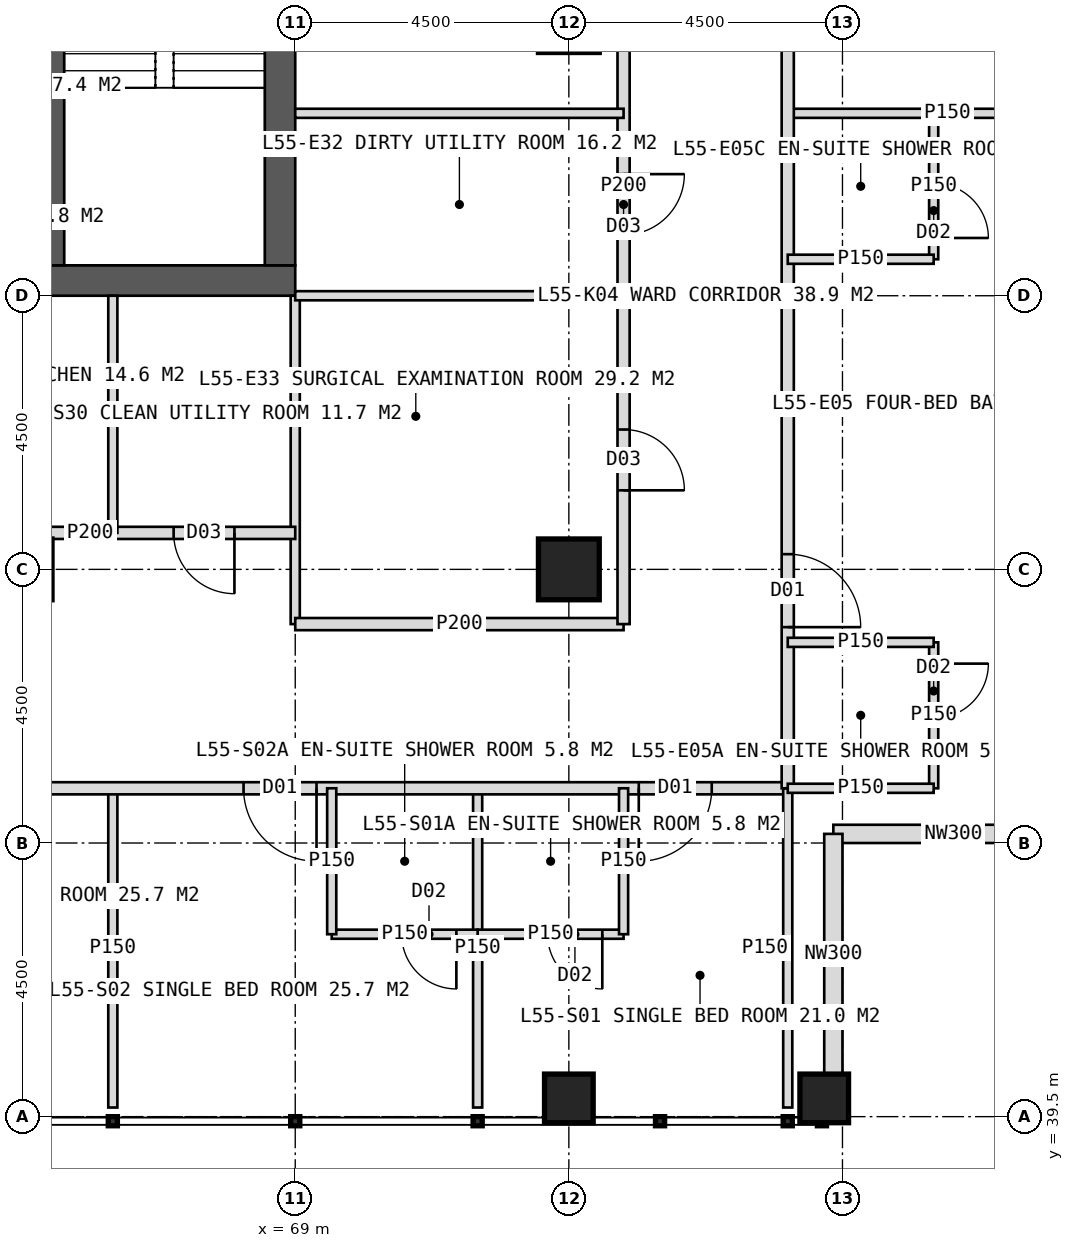
"""IFC4 building model, lengths in metres.
Left out: names, types, materials, properties, quantities, classifications, styles, units other than length and angle.
Written with IfcOpenShell. Run it as: python <this file> out.ifc"""

import sys

from ifc_helpers import new_model, si_unit, direction, frame, frame_2d, origin, origin_2d, place, context, subcontext, project, spatial, rectangle, hollow_rectangle, extrude, element, fill, save


model = new_model("IFC4")
c1 = context("Model", 3, precision=1e-05, world=origin(), true_north=direction((0.0, 1.0)))
c2 = subcontext(c1, "Body", "Model", "MODEL_VIEW")
j1 = project(units=[si_unit("LENGTHUNIT", "METRE"), si_unit("PLANEANGLEUNIT", "RADIAN")], contexts=[c1])
p1 = place(None, origin())
s1 = spatial("IfcSite", under=j1, at=p1, CompositionType="ELEMENT")
p2 = place(p1, origin())
s2 = spatial("IfcBuilding", under=s1, at=p2, CompositionType="ELEMENT")
p3 = place(p2, frame((0.0, 0.0, 229.0)))
s3 = spatial("IfcBuildingStorey", under=s2, at=p3, CompositionType="ELEMENT", Elevation=229.0)
p4 = place(p3, frame((51.0, 53.25, 0.0), z_axis=(0.0, 0.0, 1.0), x_axis=(1.0, 0.0, 0.0)))
e1 = element("IfcWall", 1, at=p4, inside=s3, PredefinedType="SHEAR", context=c2, shape_type="SweptSolid", body=[
    extrude(rectangle(XDim=18.0, YDim=0.5, at=frame_2d((9.0, 0.0))), origin(), (0.0, 0.0, 1.0), 4.0),
])
p5 = place(p4, frame((8.1, 0.0, 0.0)))
e2 = element("IfcOpeningElement", 2, at=p5, cuts=e1, PredefinedType="OPENING", context=c2, shape_type="SweptSolid", body=[
    extrude(rectangle(XDim=1.8, YDim=2.2, at=frame_2d((0.9, 1.1))), frame((0.0, 0.26, 0.0), z_axis=(0.0, -1.0, 0.0), x_axis=(1.0, 0.0, 0.0)), (0.0, 0.0, 1.0), 0.52),
])
p6 = place(p3, frame((68.75, 53.5, 0.0), z_axis=(0.0, 0.0, 1.0), x_axis=(0.0, 1.0, 0.0)))
e3 = element("IfcWall", 3, at=p6, inside=s3, PredefinedType="SHEAR", context=c2, shape_type="SweptSolid", body=[
    extrude(rectangle(XDim=17.0, YDim=0.5, at=frame_2d((8.5, 0.0))), origin(), (0.0, 0.0, 1.0), 4.0),
])
p7 = place(p6, frame((9.6, 0.0, 0.0)))
e4 = element("IfcOpeningElement", 4, at=p7, cuts=e3, PredefinedType="OPENING", context=c2, shape_type="SweptSolid", body=[
    extrude(rectangle(XDim=1.5, YDim=2.2, at=frame_2d((0.75, 1.1))), frame((0.0, 0.26, 0.0), z_axis=(0.0, -1.0, 0.0), x_axis=(1.0, 0.0, 0.0)), (0.0, 0.0, 1.0), 0.52),
])
p8 = place(p3, frame((65.05, 53.5, 0.0), z_axis=(0.0, 0.0, 1.0), x_axis=(0.0, 1.0, 0.0)))
e5 = element("IfcWall", 5, at=p8, inside=s3, PredefinedType="SHEAR", context=c2, shape_type="SweptSolid", body=[
    extrude(rectangle(XDim=17.0, YDim=0.3, at=frame_2d((8.5, 0.0))), origin(), (0.0, 0.0, 1.0), 4.0),
])
p9 = place(p3, frame((73.5, 48.5, 0.0), z_axis=(0.0, 0.0, 1.0), x_axis=(1.0, 0.0, 0.0)))
e6 = element("IfcColumn", 6, at=p9, inside=s3, PredefinedType="COLUMN", context=c2, shape_type="SweptSolid", body=[
    extrude(hollow_rectangle(XDim=1.0, YDim=1.0, WallThickness=0.1, at=origin_2d()), origin(), (0.0, 0.0, 1.0), 4.0),
])
for number, where, z_axis, x_axis in (
    (7, (73.5, 39.8, 0.0), (0.0, 0.0, 1.0), (1.0, 0.0, 0.0)),
    (8, (77.7, 39.8, 0.0), (0.0, 0.0, 1.0), (1.0, 0.0, 0.0)),
):
    element("IfcColumn", number, at=place(p3, frame(where, z_axis=z_axis, x_axis=x_axis)), inside=s3, PredefinedType="COLUMN", context=c2, shape_type="SweptSolid", body=[
        extrude(hollow_rectangle(XDim=0.8, YDim=0.8, WallThickness=0.08, at=origin_2d()), origin(), (0.0, 0.0, 1.0), 4.0),
    ])
for number, where, z_axis, x_axis in (
    (9, (81.8, 44.15, 0.0), (0.0, 0.0, 1.0), (-1.0, 0.0, 0.0)),
    (10, (77.85, 44.15, 0.0), (0.0, 0.0, 1.0), (0.0, -1.0, 0.0)),
):
    element("IfcWall", number, at=place(p3, frame(where, z_axis=z_axis, x_axis=x_axis)), inside=s3, PredefinedType="ELEMENTEDWALL", context=c2, shape_type="SweptSolid", body=[
        extrude(rectangle(XDim=3.95, YDim=0.3, at=frame_2d((1.975, 0.0))), origin(), (0.0, 0.0, 1.0), 2.85),
    ])
for number, where, z_axis, x_axis in (
    (11, (72.0, 44.9, 0.0), (0.0, 0.0, 1.0), (0.0, -1.0, 0.0)),
    (12, (66.0, 44.9, 0.0), (0.0, 0.0, 1.0), (0.0, -1.0, 0.0)),
):
    element("IfcWall", number, at=place(p3, frame(where, z_axis=z_axis, x_axis=x_axis)), inside=s3, PredefinedType="PARTITIONING", context=c2, shape_type="SweptSolid", body=[
        extrude(rectangle(XDim=5.25, YDim=0.15, at=frame_2d((2.625, 0.0))), origin(), (0.0, 0.0, 1.0), 3.75),
    ])
p10 = place(p3, frame((77.1, 44.9, 0.0), z_axis=(0.0, 0.0, 1.0), x_axis=(-1.0, 0.0, 0.0)))
e13 = element("IfcWall", 13, at=p10, inside=s3, PredefinedType="PARTITIONING", context=c2, shape_type="SweptSolid", body=[
    extrude(rectangle(XDim=34.2, YDim=0.2, at=frame_2d((17.1, 0.0))), origin(), (0.0, 0.0, 1.0), 3.75),
])
p11 = place(p10, frame((1.25, 0.0, 0.0)))
e14 = element("IfcOpeningElement", 14, at=p11, cuts=e13, PredefinedType="OPENING", context=c2, shape_type="SweptSolid", body=[
    extrude(rectangle(XDim=1.2, YDim=2.2, at=frame_2d((0.6, 1.1))), frame((0.0, 0.11, 0.0), z_axis=(0.0, -1.0, 0.0), x_axis=(1.0, 0.0, 0.0)), (0.0, 0.0, 1.0), 0.22),
])
p12 = place(p10, frame((7.75, 0.0, 0.0)))
e15 = element("IfcOpeningElement", 15, at=p12, cuts=e13, PredefinedType="OPENING", context=c2, shape_type="SweptSolid", body=[
    extrude(rectangle(XDim=1.2, YDim=2.2, at=frame_2d((0.6, 1.1))), frame((0.0, 0.11, 0.0), z_axis=(0.0, -1.0, 0.0), x_axis=(1.0, 0.0, 0.0)), (0.0, 0.0, 1.0), 0.22),
])
p13 = place(p10, frame((13.25, 0.0, 0.0)))
e16 = element("IfcOpeningElement", 16, at=p13, cuts=e13, PredefinedType="OPENING", context=c2, shape_type="SweptSolid", body=[
    extrude(rectangle(XDim=1.2, YDim=2.2, at=frame_2d((0.6, 1.1))), frame((0.0, 0.11, 0.0), z_axis=(0.0, -1.0, 0.0), x_axis=(1.0, 0.0, 0.0)), (0.0, 0.0, 1.0), 0.22),
])
p14 = place(p10, frame((19.75, 0.0, 0.0)))
e17 = element("IfcOpeningElement", 17, at=p14, cuts=e13, PredefinedType="OPENING", context=c2, shape_type="SweptSolid", body=[
    extrude(rectangle(XDim=1.2, YDim=2.2, at=frame_2d((0.6, 1.1))), frame((0.0, 0.11, 0.0), z_axis=(0.0, -1.0, 0.0), x_axis=(1.0, 0.0, 0.0)), (0.0, 0.0, 1.0), 0.22),
])
p15 = place(p10, frame((30.35, 0.0, 0.0)))
e18 = element("IfcOpeningElement", 18, at=p15, cuts=e13, PredefinedType="OPENING", context=c2, shape_type="SweptSolid", body=[
    extrude(rectangle(XDim=1.2, YDim=2.2, at=frame_2d((0.6, 1.1))), frame((0.0, 0.11, 0.0), z_axis=(0.0, -1.0, 0.0), x_axis=(1.0, 0.0, 0.0)), (0.0, 0.0, 1.0), 0.22),
])
p16 = place(p3, frame((77.1, 44.9, 0.0), z_axis=(0.0, 0.0, 1.0), x_axis=(0.0, -1.0, 0.0)))
e19 = element("IfcWall", 19, at=p16, inside=s3, PredefinedType="PARTITIONING", context=c2, shape_type="SweptSolid", body=[
    extrude(rectangle(XDim=5.25, YDim=0.15, at=frame_2d((2.625, 0.0))), origin(), (0.0, 0.0, 1.0), 3.75),
])
p17 = place(p3, frame((74.4, 42.5, 0.0), z_axis=(0.0, 0.0, 1.0), x_axis=(-1.0, 0.0, 0.0)))
e20 = element("IfcWall", 20, at=p17, inside=s3, PredefinedType="PARTITIONING", context=c2, shape_type="SweptSolid", body=[
    extrude(rectangle(XDim=2.4, YDim=0.15, at=frame_2d((1.2, 0.0))), origin(), (0.0, 0.0, 1.0), 3.75),
])
p18 = place(p17, frame((0.35, 0.0, 0.0)))
e21 = element("IfcOpeningElement", 21, at=p18, cuts=e20, PredefinedType="OPENING", context=c2, shape_type="SweptSolid", body=[
    extrude(rectangle(XDim=0.9, YDim=2.1, at=frame_2d((0.45, 1.05))), frame((0.0, 0.085, 0.0), z_axis=(0.0, -1.0, 0.0), x_axis=(1.0, 0.0, 0.0)), (0.0, 0.0, 1.0), 0.17),
])
p19 = place(p3, frame((74.4, 44.9, 0.0), z_axis=(0.0, 0.0, 1.0), x_axis=(0.0, -1.0, 0.0)))
e22 = element("IfcWall", 22, at=p19, inside=s3, PredefinedType="PARTITIONING", context=c2, shape_type="SweptSolid", body=[
    extrude(rectangle(XDim=2.4, YDim=0.15, at=frame_2d((1.2, 0.0))), origin(), (0.0, 0.0, 1.0), 3.75),
])
p20 = place(p3, frame((72.0, 42.5, 0.0), z_axis=(0.0, 0.0, 1.0), x_axis=(-1.0, 0.0, 0.0)))
e23 = element("IfcWall", 23, at=p20, inside=s3, PredefinedType="PARTITIONING", context=c2, shape_type="SweptSolid", body=[
    extrude(rectangle(XDim=2.4, YDim=0.15, at=frame_2d((1.2, 0.0))), origin(), (0.0, 0.0, 1.0), 3.75),
])
p21 = place(p20, frame((0.35, 0.0, 0.0)))
e24 = element("IfcOpeningElement", 24, at=p21, cuts=e23, PredefinedType="OPENING", context=c2, shape_type="SweptSolid", body=[
    extrude(rectangle(XDim=0.9, YDim=2.1, at=frame_2d((0.45, 1.05))), frame((0.0, 0.085, 0.0), z_axis=(0.0, -1.0, 0.0), x_axis=(1.0, 0.0, 0.0)), (0.0, 0.0, 1.0), 0.17),
])
p22 = place(p3, frame((69.6, 44.9, 0.0), z_axis=(0.0, 0.0, 1.0), x_axis=(0.0, -1.0, 0.0)))
e25 = element("IfcWall", 25, at=p22, inside=s3, PredefinedType="PARTITIONING", context=c2, shape_type="SweptSolid", body=[
    extrude(rectangle(XDim=2.4, YDim=0.15, at=frame_2d((1.2, 0.0))), origin(), (0.0, 0.0, 1.0), 3.75),
])
p23 = place(p3, frame((69.0, 53.0, 0.0), z_axis=(0.0, 0.0, 1.0), x_axis=(0.0, -1.0, 0.0)))
e26 = element("IfcWall", 26, at=p23, inside=s3, PredefinedType="PARTITIONING", context=c2, shape_type="SweptSolid", body=[
    extrude(rectangle(XDim=5.4, YDim=0.15, at=frame_2d((2.7, 0.0))), origin(), (0.0, 0.0, 1.0), 3.75),
])
p24 = place(p3, frame((74.4, 47.6, 0.0), z_axis=(0.0, 0.0, 1.0), x_axis=(-1.0, 0.0, 0.0)))
e27 = element("IfcWall", 27, at=p24, inside=s3, PredefinedType="PARTITIONING", context=c2, shape_type="SweptSolid", body=[
    extrude(rectangle(XDim=5.4, YDim=0.2, at=frame_2d((2.7, 0.0))), origin(), (0.0, 0.0, 1.0), 3.75),
])
p25 = place(p3, frame((69.0, 49.1, 0.0), z_axis=(0.0, 0.0, 1.0), x_axis=(-1.0, 0.0, 0.0)))
e28 = element("IfcWall", 28, at=p25, inside=s3, PredefinedType="PARTITIONING", context=c2, shape_type="SweptSolid", body=[
    extrude(rectangle(XDim=6.75, YDim=0.2, at=frame_2d((3.375, 0.0))), origin(), (0.0, 0.0, 1.0), 3.75),
])
p26 = place(p25, frame((1.0, 0.0, 0.0)))
e29 = element("IfcOpeningElement", 29, at=p26, cuts=e28, PredefinedType="OPENING", context=c2, shape_type="SweptSolid", body=[
    extrude(rectangle(XDim=1.0, YDim=2.1, at=frame_2d((0.5, 1.05))), frame((0.0, 0.11, 0.0), z_axis=(0.0, -1.0, 0.0), x_axis=(1.0, 0.0, 0.0)), (0.0, 0.0, 1.0), 0.22),
])
p27 = place(p25, frame((5.425, 0.0, 0.0)))
e30 = element("IfcOpeningElement", 30, at=p27, cuts=e28, PredefinedType="OPENING", context=c2, shape_type="SweptSolid", body=[
    extrude(rectangle(XDim=1.0, YDim=2.1, at=frame_2d((0.5, 1.05))), frame((0.0, 0.11, 0.0), z_axis=(0.0, -1.0, 0.0), x_axis=(1.0, 0.0, 0.0)), (0.0, 0.0, 1.0), 0.22),
])
p28 = place(p3, frame((66.0, 53.0, 0.0), z_axis=(0.0, 0.0, 1.0), x_axis=(0.0, -1.0, 0.0)))
e31 = element("IfcWall", 31, at=p28, inside=s3, PredefinedType="PARTITIONING", context=c2, shape_type="SweptSolid", body=[
    extrude(rectangle(XDim=3.9, YDim=0.15, at=frame_2d((1.95, 0.0))), origin(), (0.0, 0.0, 1.0), 3.75),
])
p29 = place(p3, frame((77.1, 56.0, 0.0), z_axis=(0.0, 0.0, 1.0), x_axis=(1.0, 0.0, 0.0)))
e32 = element("IfcWall", 32, at=p29, inside=s3, PredefinedType="PARTITIONING", context=c2, shape_type="SweptSolid", body=[
    extrude(rectangle(XDim=5.25, YDim=0.15, at=frame_2d((2.625, 0.0))), origin(), (0.0, 0.0, 1.0), 3.75),
])
p30 = place(p3, frame((77.1, 79.1, 0.0), z_axis=(0.0, 0.0, 1.0), x_axis=(0.0, -1.0, 0.0)))
e33 = element("IfcWall", 33, at=p30, inside=s3, PredefinedType="PARTITIONING", context=c2, shape_type="SweptSolid", body=[
    extrude(rectangle(XDim=34.2, YDim=0.2, at=frame_2d((17.1, 0.0))), origin(), (0.0, 0.0, 1.0), 3.75),
])
p31 = place(p30, frame((3.65, 0.0, 0.0)))
e34 = element("IfcOpeningElement", 34, at=p31, cuts=e33, PredefinedType="OPENING", context=c2, shape_type="SweptSolid", body=[
    extrude(rectangle(XDim=1.2, YDim=2.2, at=frame_2d((0.6, 1.1))), frame((0.0, 0.11, 0.0), z_axis=(0.0, -1.0, 0.0), x_axis=(1.0, 0.0, 0.0)), (0.0, 0.0, 1.0), 0.22),
])
p32 = place(p30, frame((10.75, 0.0, 0.0)))
e35 = element("IfcOpeningElement", 35, at=p32, cuts=e33, PredefinedType="OPENING", context=c2, shape_type="SweptSolid", body=[
    extrude(rectangle(XDim=1.2, YDim=2.2, at=frame_2d((0.6, 1.1))), frame((0.0, 0.11, 0.0), z_axis=(0.0, -1.0, 0.0), x_axis=(1.0, 0.0, 0.0)), (0.0, 0.0, 1.0), 0.22),
])
p33 = place(p30, frame((15.1, 0.0, 0.0)))
e36 = element("IfcOpeningElement", 36, at=p33, cuts=e33, PredefinedType="OPENING", context=c2, shape_type="SweptSolid", body=[
    extrude(rectangle(XDim=1.0, YDim=2.1, at=frame_2d((0.5, 1.05))), frame((0.0, 0.11, 0.0), z_axis=(0.0, -1.0, 0.0), x_axis=(1.0, 0.0, 0.0)), (0.0, 0.0, 1.0), 0.22),
])
p34 = place(p30, frame((19.75, 0.0, 0.0)))
e37 = element("IfcOpeningElement", 37, at=p34, cuts=e33, PredefinedType="OPENING", context=c2, shape_type="SweptSolid", body=[
    extrude(rectangle(XDim=1.2, YDim=2.2, at=frame_2d((0.6, 1.1))), frame((0.0, 0.11, 0.0), z_axis=(0.0, -1.0, 0.0), x_axis=(1.0, 0.0, 0.0)), (0.0, 0.0, 1.0), 0.22),
])
p35 = place(p30, frame((30.35, 0.0, 0.0)))
e38 = element("IfcOpeningElement", 38, at=p35, cuts=e33, PredefinedType="OPENING", context=c2, shape_type="SweptSolid", body=[
    extrude(rectangle(XDim=1.2, YDim=2.2, at=frame_2d((0.6, 1.1))), frame((0.0, 0.11, 0.0), z_axis=(0.0, -1.0, 0.0), x_axis=(1.0, 0.0, 0.0)), (0.0, 0.0, 1.0), 0.22),
])
p36 = place(p3, frame((79.5, 47.3, 0.0), z_axis=(0.0, 0.0, 1.0), x_axis=(0.0, -1.0, 0.0)))
e39 = element("IfcWall", 39, at=p36, inside=s3, PredefinedType="PARTITIONING", context=c2, shape_type="SweptSolid", body=[
    extrude(rectangle(XDim=2.4, YDim=0.15, at=frame_2d((1.2, 0.0))), origin(), (0.0, 0.0, 1.0), 3.75),
])
p37 = place(p36, frame((0.35, 0.0, 0.0)))
e40 = element("IfcOpeningElement", 40, at=p37, cuts=e39, PredefinedType="OPENING", context=c2, shape_type="SweptSolid", body=[
    extrude(rectangle(XDim=0.9, YDim=2.1, at=frame_2d((0.45, 1.05))), frame((0.0, 0.085, 0.0), z_axis=(0.0, -1.0, 0.0), x_axis=(1.0, 0.0, 0.0)), (0.0, 0.0, 1.0), 0.17),
])
p38 = place(p3, frame((77.1, 47.3, 0.0), z_axis=(0.0, 0.0, 1.0), x_axis=(1.0, 0.0, 0.0)))
e41 = element("IfcWall", 41, at=p38, inside=s3, PredefinedType="PARTITIONING", context=c2, shape_type="SweptSolid", body=[
    extrude(rectangle(XDim=2.4, YDim=0.15, at=frame_2d((1.2, 0.0))), origin(), (0.0, 0.0, 1.0), 3.75),
])
p39 = place(p3, frame((79.5, 56.0, 0.0), z_axis=(0.0, 0.0, 1.0), x_axis=(0.0, -1.0, 0.0)))
e42 = element("IfcWall", 42, at=p39, inside=s3, PredefinedType="PARTITIONING", context=c2, shape_type="SweptSolid", body=[
    extrude(rectangle(XDim=2.4, YDim=0.15, at=frame_2d((1.2, 0.0))), origin(), (0.0, 0.0, 1.0), 3.75),
])
p40 = place(p39, frame((1.15, 0.0, 0.0)))
e43 = element("IfcOpeningElement", 43, at=p40, cuts=e42, PredefinedType="OPENING", context=c2, shape_type="SweptSolid", body=[
    extrude(rectangle(XDim=0.9, YDim=2.1, at=frame_2d((0.45, 1.05))), frame((0.0, 0.085, 0.0), z_axis=(0.0, -1.0, 0.0), x_axis=(1.0, 0.0, 0.0)), (0.0, 0.0, 1.0), 0.17),
])
for number, where, z_axis, x_axis in (
    (44, (77.1, 53.6, 0.0), (0.0, 0.0, 1.0), (1.0, 0.0, 0.0)),
    (45, (77.1, 44.9, 0.0), (0.0, 0.0, 1.0), (1.0, 0.0, 0.0)),
):
    element("IfcWall", number, at=place(p3, frame(where, z_axis=z_axis, x_axis=x_axis)), inside=s3, PredefinedType="PARTITIONING", context=c2, shape_type="SweptSolid", body=[
        extrude(rectangle(XDim=2.4, YDim=0.15, at=frame_2d((1.2, 0.0))), origin(), (0.0, 0.0, 1.0), 3.75),
    ])
p41 = place(p3, frame((74.4, 62.0, 0.0), z_axis=(0.0, 0.0, 1.0), x_axis=(0.0, -1.0, 0.0)))
e46 = element("IfcWall", 46, at=p41, inside=s3, PredefinedType="PARTITIONING", context=c2, shape_type="SweptSolid", body=[
    extrude(rectangle(XDim=14.4, YDim=0.2, at=frame_2d((7.2, 0.0))), origin(), (0.0, 0.0, 1.0), 3.75),
])
p42 = place(p41, frame((2.5, 0.0, 0.0)))
e47 = element("IfcOpeningElement", 47, at=p42, cuts=e46, PredefinedType="OPENING", context=c2, shape_type="SweptSolid", body=[
    extrude(rectangle(XDim=1.0, YDim=2.1, at=frame_2d((0.5, 1.05))), frame((0.0, 0.11, 0.0), z_axis=(0.0, -1.0, 0.0), x_axis=(1.0, 0.0, 0.0)), (0.0, 0.0, 1.0), 0.22),
])
p43 = place(p41, frame((7.0, 0.0, 0.0)))
e48 = element("IfcOpeningElement", 48, at=p43, cuts=e46, PredefinedType="OPENING", context=c2, shape_type="SweptSolid", body=[
    extrude(rectangle(XDim=1.0, YDim=2.1, at=frame_2d((0.5, 1.05))), frame((0.0, 0.11, 0.0), z_axis=(0.0, -1.0, 0.0), x_axis=(1.0, 0.0, 0.0)), (0.0, 0.0, 1.0), 0.22),
])
p44 = place(p41, frame((11.2, 0.0, 0.0)))
e49 = element("IfcOpeningElement", 49, at=p44, cuts=e46, PredefinedType="OPENING", context=c2, shape_type="SweptSolid", body=[
    extrude(rectangle(XDim=1.0, YDim=2.1, at=frame_2d((0.5, 1.05))), frame((0.0, 0.11, 0.0), z_axis=(0.0, -1.0, 0.0), x_axis=(1.0, 0.0, 0.0)), (0.0, 0.0, 1.0), 0.22),
])
for number, where, z_axis, x_axis in (
    (50, (69.0, 56.0, 0.0), (0.0, 0.0, 1.0), (1.0, 0.0, 0.0)),
    (51, (69.0, 53.0, 0.0), (0.0, 0.0, 1.0), (1.0, 0.0, 0.0)),
):
    element("IfcWall", number, at=place(p3, frame(where, z_axis=z_axis, x_axis=x_axis)), inside=s3, PredefinedType="PARTITIONING", context=c2, shape_type="SweptSolid", body=[
        extrude(rectangle(XDim=5.4, YDim=0.15, at=frame_2d((2.7, 0.0))), origin(), (0.0, 0.0, 1.0), 3.75),
    ])
p45 = place(p11, origin())
e52 = element("IfcDoor", 52, at=p45, inside=s3, OperationType="SINGLE_SWING_RIGHT", PredefinedType="DOOR", context=c2, shape_type="SweptSolid", body=[
    extrude(rectangle(XDim=1.2, YDim=2.2, at=frame_2d((0.6, 1.1))), frame((0.0, 0.025, 0.0), z_axis=(0.0, -1.0, 0.0), x_axis=(1.0, 0.0, 0.0)), (0.0, 0.0, 1.0), 0.05),
])
fill(e14, e52)
p46 = place(p18, origin())
e53 = element("IfcDoor", 53, at=p46, inside=s3, OperationType="SINGLE_SWING_LEFT", PredefinedType="DOOR", context=c2, shape_type="SweptSolid", body=[
    extrude(rectangle(XDim=0.9, YDim=2.1, at=frame_2d((0.45, 1.05))), frame((0.0, 0.025, 0.0), z_axis=(0.0, -1.0, 0.0), x_axis=(1.0, 0.0, 0.0)), (0.0, 0.0, 1.0), 0.05),
])
fill(e21, e53)
p47 = place(p12, origin())
e54 = element("IfcDoor", 54, at=p47, inside=s3, OperationType="SINGLE_SWING_LEFT", PredefinedType="DOOR", context=c2, shape_type="SweptSolid", body=[
    extrude(rectangle(XDim=1.2, YDim=2.2, at=frame_2d((0.6, 1.1))), frame((0.0, 0.025, 0.0), z_axis=(0.0, -1.0, 0.0), x_axis=(1.0, 0.0, 0.0)), (0.0, 0.0, 1.0), 0.05),
])
fill(e15, e54)
p48 = place(p21, origin())
e55 = element("IfcDoor", 55, at=p48, inside=s3, OperationType="SINGLE_SWING_LEFT", PredefinedType="DOOR", context=c2, shape_type="SweptSolid", body=[
    extrude(rectangle(XDim=0.9, YDim=2.1, at=frame_2d((0.45, 1.05))), frame((0.0, 0.025, 0.0), z_axis=(0.0, -1.0, 0.0), x_axis=(1.0, 0.0, 0.0)), (0.0, 0.0, 1.0), 0.05),
])
fill(e24, e55)
p49 = place(p26, origin())
e56 = element("IfcDoor", 56, at=p49, inside=s3, OperationType="SINGLE_SWING_LEFT", PredefinedType="DOOR", context=c2, shape_type="SweptSolid", body=[
    extrude(rectangle(XDim=1.0, YDim=2.1, at=frame_2d((0.5, 1.05))), frame((0.0, 0.025, 0.0), z_axis=(0.0, -1.0, 0.0), x_axis=(1.0, 0.0, 0.0)), (0.0, 0.0, 1.0), 0.05),
])
fill(e29, e56)
p50 = place(p35, origin())
e57 = element("IfcDoor", 57, at=p50, inside=s3, OperationType="SINGLE_SWING_RIGHT", PredefinedType="DOOR", context=c2, shape_type="SweptSolid", body=[
    extrude(rectangle(XDim=1.2, YDim=2.2, at=frame_2d((0.6, 1.1))), frame((0.0, 0.025, 0.0), z_axis=(0.0, -1.0, 0.0), x_axis=(1.0, 0.0, 0.0)), (0.0, 0.0, 1.0), 0.05),
])
fill(e38, e57)
p51 = place(p37, origin())
e58 = element("IfcDoor", 58, at=p51, inside=s3, OperationType="SINGLE_SWING_LEFT", PredefinedType="DOOR", context=c2, shape_type="SweptSolid", body=[
    extrude(rectangle(XDim=0.9, YDim=2.1, at=frame_2d((0.45, 1.05))), frame((0.0, 0.025, 0.0), z_axis=(0.0, -1.0, 0.0), x_axis=(1.0, 0.0, 0.0)), (0.0, 0.0, 1.0), 0.05),
])
fill(e40, e58)
p52 = place(p40, origin())
e59 = element("IfcDoor", 59, at=p52, inside=s3, OperationType="SINGLE_SWING_RIGHT", PredefinedType="DOOR", context=c2, shape_type="SweptSolid", body=[
    extrude(rectangle(XDim=0.9, YDim=2.1, at=frame_2d((0.45, 1.05))), frame((0.0, 0.025, 0.0), z_axis=(0.0, -1.0, 0.0), x_axis=(1.0, 0.0, 0.0)), (0.0, 0.0, 1.0), 0.05),
])
fill(e43, e59)
p53 = place(p43, origin())
e60 = element("IfcDoor", 60, at=p53, inside=s3, OperationType="SINGLE_SWING_LEFT", PredefinedType="DOOR", context=c2, shape_type="SweptSolid", body=[
    extrude(rectangle(XDim=1.0, YDim=2.1, at=frame_2d((0.5, 1.05))), frame((0.0, 0.025, 0.0), z_axis=(0.0, -1.0, 0.0), x_axis=(1.0, 0.0, 0.0)), (0.0, 0.0, 1.0), 0.05),
])
fill(e48, e60)
p54 = place(p44, origin())
e61 = element("IfcDoor", 61, at=p54, inside=s3, OperationType="SINGLE_SWING_RIGHT", PredefinedType="DOOR", context=c2, shape_type="SweptSolid", body=[
    extrude(rectangle(XDim=1.0, YDim=2.1, at=frame_2d((0.5, 1.05))), frame((0.0, 0.025, 0.0), z_axis=(0.0, -1.0, 0.0), x_axis=(1.0, 0.0, 0.0)), (0.0, 0.0, 1.0), 0.05),
])
fill(e49, e61)
save(model, sys.argv[1])
